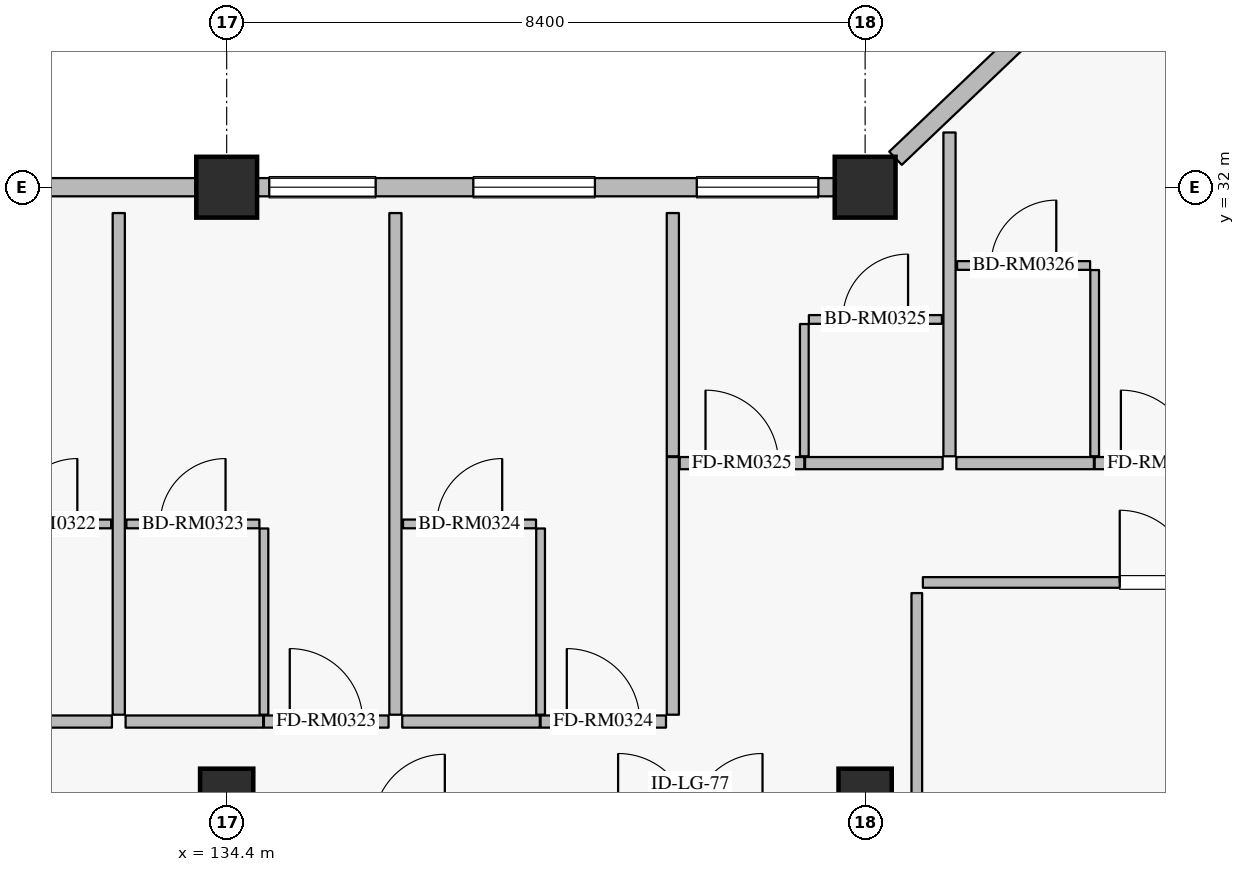
"""IFC4 building model, lengths in metres.
Left out: names, types, materials, properties, quantities, classifications, styles, units other than length and angle.
Written with IfcOpenShell. Run it as: python <this file> out.ifc"""

import sys

from ifc_helpers import new_model, si_unit, direction, frame, frame_2d, origin, origin_2d, place, context, subcontext, project, spatial, rectangle, extrude, element, fill, save


model = new_model("IFC4")
c1 = context("Model", 3, precision=1e-05, world=origin(), true_north=direction((0.0, 1.0)))
c2 = subcontext(c1, "Body", "Model", "MODEL_VIEW")
j1 = project(units=[si_unit("LENGTHUNIT", "METRE"), si_unit("PLANEANGLEUNIT", "RADIAN")], contexts=[c1])
p1 = place(None, origin())
s1 = spatial("IfcSite", under=j1, at=p1, CompositionType="ELEMENT")
p2 = place(p1, origin())
s2 = spatial("IfcBuilding", under=s1, at=p2, CompositionType="ELEMENT")
p3 = place(p2, frame((0.0, 0.0, 11.4)))
s3 = spatial("IfcBuildingStorey", under=s2, at=p3, CompositionType="ELEMENT", Elevation=11.4)
for number, where, z_axis, x_axis in (
    (1, (134.4, 32.0, 0.0), (0.0, 0.0, 1.0), (1.0, 0.0, 0.0)),
    (2, (142.8, 32.0, 0.0), (0.0, 0.0, 1.0), (1.0, 0.0, 0.0)),
):
    element("IfcColumn", number, at=place(p3, frame(where, z_axis=z_axis, x_axis=x_axis)), inside=s3, PredefinedType="COLUMN", context=c2, shape_type="SweptSolid", body=[
        extrude(rectangle(XDim=0.8, YDim=0.8, at=origin_2d()), origin(), (0.0, 0.0, 1.0), 4.8),
    ])
for number, where, z_axis, x_axis in (
    (3, (134.4, 24.0, 0.0), (0.0, 0.0, 1.0), (1.0, 0.0, 0.0)),
    (4, (142.8, 24.0, 0.0), (0.0, 0.0, 1.0), (1.0, 0.0, 0.0)),
):
    element("IfcColumn", number, at=place(p3, frame(where, z_axis=z_axis, x_axis=x_axis)), inside=s3, PredefinedType="COLUMN", context=c2, shape_type="SweptSolid", body=[
        extrude(rectangle(XDim=0.7, YDim=0.7, at=origin_2d()), origin(), (0.0, 0.0, 1.0), 4.8),
    ])
p4 = place(p3, frame((126.4, 32.0, 0.0), z_axis=(0.0, 0.0, 1.0), x_axis=(1.0, 0.0, 0.0)))
e5 = element("IfcWall", 5, at=p4, inside=s3, PredefinedType="SOLIDWALL", context=c2, shape_type="SweptSolid", body=[
    extrude(rectangle(XDim=7.6, YDim=0.24, at=frame_2d((3.8, 0.0))), origin(), (0.0, 0.0, 1.0), 4.1),
])
p5 = place(p4, frame((0.615, 0.0, 0.8)))
e6 = element("IfcOpeningElement", 6, at=p5, cuts=e5, PredefinedType="OPENING", context=c2, shape_type="SweptSolid", body=[
    extrude(rectangle(XDim=1.6, YDim=1.6, at=frame_2d((0.8, 0.8))), frame((0.0, 0.13, 0.0), z_axis=(0.0, -1.0, 0.0), x_axis=(1.0, 0.0, 0.0)), (0.0, 0.0, 1.0), 0.26),
])
p6 = place(p4, frame((3.955, 0.0, 0.8)))
e7 = element("IfcOpeningElement", 7, at=p6, cuts=e5, PredefinedType="OPENING", context=c2, shape_type="SweptSolid", body=[
    extrude(rectangle(XDim=1.6, YDim=1.6, at=frame_2d((0.8, 0.8))), frame((0.0, 0.13, 0.0), z_axis=(0.0, -1.0, 0.0), x_axis=(1.0, 0.0, 0.0)), (0.0, 0.0, 1.0), 0.26),
])
p7 = place(p3, frame((134.8, 32.0, 0.0), z_axis=(0.0, 0.0, 1.0), x_axis=(1.0, 0.0, 0.0)))
e8 = element("IfcWall", 8, at=p7, inside=s3, PredefinedType="SOLIDWALL", context=c2, shape_type="SweptSolid", body=[
    extrude(rectangle(XDim=7.6, YDim=0.24, at=frame_2d((3.8, 0.0))), origin(), (0.0, 0.0, 1.0), 4.13),
])
p8 = place(p7, frame((0.16, 0.0, 0.8)))
e9 = element("IfcOpeningElement", 9, at=p8, cuts=e8, PredefinedType="OPENING", context=c2, shape_type="SweptSolid", body=[
    extrude(rectangle(XDim=1.4, YDim=1.6, at=frame_2d((0.7, 0.8))), frame((0.0, 0.13, 0.0), z_axis=(0.0, -1.0, 0.0), x_axis=(1.0, 0.0, 0.0)), (0.0, 0.0, 1.0), 0.26),
])
p9 = place(p7, frame((2.845, 0.0, 0.8)))
e10 = element("IfcOpeningElement", 10, at=p9, cuts=e8, PredefinedType="OPENING", context=c2, shape_type="SweptSolid", body=[
    extrude(rectangle(XDim=1.6, YDim=1.6, at=frame_2d((0.8, 0.8))), frame((0.0, 0.13, 0.0), z_axis=(0.0, -1.0, 0.0), x_axis=(1.0, 0.0, 0.0)), (0.0, 0.0, 1.0), 0.26),
])
p10 = place(p7, frame((5.785, 0.0, 0.8)))
e11 = element("IfcOpeningElement", 11, at=p10, cuts=e8, PredefinedType="OPENING", context=c2, shape_type="SweptSolid", body=[
    extrude(rectangle(XDim=1.6, YDim=1.6, at=frame_2d((0.8, 0.8))), frame((0.0, 0.13, 0.0), z_axis=(0.0, -1.0, 0.0), x_axis=(1.0, 0.0, 0.0)), (0.0, 0.0, 1.0), 0.26),
])
p11 = place(p3, frame((143.2, 32.381, 0.0), z_axis=(0.0, 0.0, 1.0), x_axis=(0.724156739794, 0.689635422677, 0.0)))
e12 = element("IfcWall", 12, at=p11, inside=s3, PredefinedType="SOLIDWALL", context=c2, shape_type="SweptSolid", body=[
    extrude(rectangle(XDim=10.495, YDim=0.24, at=frame_2d((5.248, 0.0))), origin(), (0.0, 0.0, 1.0), 4.13),
])
p12 = place(p11, frame((2.701, 0.0, 0.8)))
e13 = element("IfcOpeningElement", 13, at=p12, cuts=e12, PredefinedType="OPENING", context=c2, shape_type="SweptSolid", body=[
    extrude(rectangle(XDim=1.6, YDim=1.6, at=frame_2d((0.8, 0.8))), frame((0.0, 0.13, 0.0), z_axis=(0.0, -1.0, 0.0), x_axis=(1.0, 0.0, 0.0)), (0.0, 0.0, 1.0), 0.26),
])
p13 = place(p11, frame((7.527, 0.0, 0.8)))
e14 = element("IfcOpeningElement", 14, at=p13, cuts=e12, PredefinedType="OPENING", context=c2, shape_type="SweptSolid", body=[
    extrude(rectangle(XDim=1.6, YDim=1.6, at=frame_2d((0.8, 0.8))), frame((0.0, 0.13, 0.0), z_axis=(0.0, -1.0, 0.0), x_axis=(1.0, 0.0, 0.0)), (0.0, 0.0, 1.0), 0.26),
])
p14 = place(p3, frame((131.08, 24.97, 0.0), z_axis=(0.0, 0.0, 1.0), x_axis=(1.0, 0.0, 0.0)))
e15 = element("IfcWall", 15, at=p14, inside=s3, PredefinedType="PARTITIONING", context=c2, shape_type="SweptSolid", body=[
    extrude(rectangle(XDim=1.81, YDim=0.16, at=frame_2d((0.905, 0.0))), origin(), (0.0, 0.0, 1.0), 4.535),
])
p15 = place(p3, frame((131.13, 27.57, 0.0), z_axis=(0.0, 0.0, 1.0), x_axis=(1.0, 0.0, 0.0)))
e16 = element("IfcWall", 16, at=p15, inside=s3, PredefinedType="PARTITIONING", context=c2, shape_type="SweptSolid", body=[
    extrude(rectangle(XDim=1.75, YDim=0.115, at=frame_2d((0.875, 0.0))), origin(), (0.0, 0.0, 1.0), 4.535),
])
p16 = place(p15, frame((0.445, 0.0, 0.0)))
e17 = element("IfcOpeningElement", 17, at=p16, cuts=e16, PredefinedType="OPENING", context=c2, shape_type="SweptSolid", body=[
    extrude(rectangle(XDim=0.86, YDim=2.12, at=frame_2d((0.43, 1.06))), frame((0.0, 0.067, 0.0), z_axis=(0.0, -1.0, 0.0), x_axis=(1.0, 0.0, 0.0)), (0.0, 0.0, 1.0), 0.135),
])
p17 = place(p3, frame((133.07, 24.97, 0.0), z_axis=(0.0, 0.0, 1.0), x_axis=(1.0, 0.0, 0.0)))
e18 = element("IfcWall", 18, at=p17, inside=s3, PredefinedType="PARTITIONING", context=c2, shape_type="SweptSolid", body=[
    extrude(rectangle(XDim=1.81, YDim=0.16, at=frame_2d((0.905, 0.0))), origin(), (0.0, 0.0, 1.0), 4.535),
])
p18 = place(p3, frame((134.89, 24.97, 0.0), z_axis=(0.0, 0.0, 1.0), x_axis=(1.0, 0.0, 0.0)))
e19 = element("IfcWall", 19, at=p18, inside=s3, PredefinedType="PARTITIONING", context=c2, shape_type="SweptSolid", body=[
    extrude(rectangle(XDim=1.64, YDim=0.16, at=frame_2d((0.82, 0.0))), origin(), (0.0, 0.0, 1.0), 4.535),
])
p19 = place(p18, frame((0.34, 0.0, 0.0)))
e20 = element("IfcOpeningElement", 20, at=p19, cuts=e19, PredefinedType="OPENING", context=c2, shape_type="SweptSolid", body=[
    extrude(rectangle(XDim=0.96, YDim=2.2, at=frame_2d((0.48, 1.1))), frame((0.0, 0.09, 0.0), z_axis=(0.0, -1.0, 0.0), x_axis=(1.0, 0.0, 0.0)), (0.0, 0.0, 1.0), 0.18),
])
p20 = place(p3, frame((134.89, 25.06, 0.0), z_axis=(0.0, 0.0, 1.0), x_axis=(0.0, 1.0, 0.0)))
e21 = element("IfcWall", 21, at=p20, inside=s3, PredefinedType="PARTITIONING", context=c2, shape_type="SweptSolid", body=[
    extrude(rectangle(XDim=2.45, YDim=0.115, at=frame_2d((1.225, 0.0))), origin(), (0.0, 0.0, 1.0), 4.535),
])
p21 = place(p3, frame((133.08, 27.57, 0.0), z_axis=(0.0, 0.0, 1.0), x_axis=(1.0, 0.0, 0.0)))
e22 = element("IfcWall", 22, at=p21, inside=s3, PredefinedType="PARTITIONING", context=c2, shape_type="SweptSolid", body=[
    extrude(rectangle(XDim=1.75, YDim=0.115, at=frame_2d((0.875, 0.0))), origin(), (0.0, 0.0, 1.0), 4.535),
])
p22 = place(p21, frame((0.445, 0.0, 0.0)))
e23 = element("IfcOpeningElement", 23, at=p22, cuts=e22, PredefinedType="OPENING", context=c2, shape_type="SweptSolid", body=[
    extrude(rectangle(XDim=0.86, YDim=2.12, at=frame_2d((0.43, 1.06))), frame((0.0, 0.067, 0.0), z_axis=(0.0, -1.0, 0.0), x_axis=(1.0, 0.0, 0.0)), (0.0, 0.0, 1.0), 0.135),
])
p23 = place(p3, frame((132.98, 25.06, 0.0), z_axis=(0.0, 0.0, 1.0), x_axis=(0.0, 1.0, 0.0)))
e24 = element("IfcWall", 24, at=p23, inside=s3, PredefinedType="PARTITIONING", context=c2, shape_type="SweptSolid", body=[
    extrude(rectangle(XDim=6.6, YDim=0.16, at=frame_2d((3.3, 0.0))), origin(), (0.0, 0.0, 1.0), 4.535),
])
p24 = place(p3, frame((136.71, 24.97, 0.0), z_axis=(0.0, 0.0, 1.0), x_axis=(1.0, 0.0, 0.0)))
e25 = element("IfcWall", 25, at=p24, inside=s3, PredefinedType="PARTITIONING", context=c2, shape_type="SweptSolid", body=[
    extrude(rectangle(XDim=1.81, YDim=0.16, at=frame_2d((0.905, 0.0))), origin(), (0.0, 0.0, 1.0), 4.535),
])
p25 = place(p3, frame((138.53, 24.97, 0.0), z_axis=(0.0, 0.0, 1.0), x_axis=(1.0, 0.0, 0.0)))
e26 = element("IfcWall", 26, at=p25, inside=s3, PredefinedType="PARTITIONING", context=c2, shape_type="SweptSolid", body=[
    extrude(rectangle(XDim=1.65, YDim=0.16, at=frame_2d((0.825, 0.0))), origin(), (0.0, 0.0, 1.0), 4.535),
])
p26 = place(p25, frame((0.345, 0.0, 0.0)))
e27 = element("IfcOpeningElement", 27, at=p26, cuts=e26, PredefinedType="OPENING", context=c2, shape_type="SweptSolid", body=[
    extrude(rectangle(XDim=0.96, YDim=2.2, at=frame_2d((0.48, 1.1))), frame((0.0, 0.09, 0.0), z_axis=(0.0, -1.0, 0.0), x_axis=(1.0, 0.0, 0.0)), (0.0, 0.0, 1.0), 0.18),
])
p27 = place(p3, frame((138.53, 25.06, 0.0), z_axis=(0.0, 0.0, 1.0), x_axis=(0.0, 1.0, 0.0)))
e28 = element("IfcWall", 28, at=p27, inside=s3, PredefinedType="PARTITIONING", context=c2, shape_type="SweptSolid", body=[
    extrude(rectangle(XDim=2.45, YDim=0.115, at=frame_2d((1.225, 0.0))), origin(), (0.0, 0.0, 1.0), 4.535),
])
p28 = place(p3, frame((136.72, 27.57, 0.0), z_axis=(0.0, 0.0, 1.0), x_axis=(1.0, 0.0, 0.0)))
e29 = element("IfcWall", 29, at=p28, inside=s3, PredefinedType="PARTITIONING", context=c2, shape_type="SweptSolid", body=[
    extrude(rectangle(XDim=1.75, YDim=0.115, at=frame_2d((0.875, 0.0))), origin(), (0.0, 0.0, 1.0), 4.535),
])
p29 = place(p28, frame((0.445, 0.0, 0.0)))
e30 = element("IfcOpeningElement", 30, at=p29, cuts=e29, PredefinedType="OPENING", context=c2, shape_type="SweptSolid", body=[
    extrude(rectangle(XDim=0.86, YDim=2.12, at=frame_2d((0.43, 1.06))), frame((0.0, 0.067, 0.0), z_axis=(0.0, -1.0, 0.0), x_axis=(1.0, 0.0, 0.0)), (0.0, 0.0, 1.0), 0.135),
])
p30 = place(p3, frame((136.62, 25.06, 0.0), z_axis=(0.0, 0.0, 1.0), x_axis=(0.0, 1.0, 0.0)))
e31 = element("IfcWall", 31, at=p30, inside=s3, PredefinedType="PARTITIONING", context=c2, shape_type="SweptSolid", body=[
    extrude(rectangle(XDim=6.6, YDim=0.16, at=frame_2d((3.3, 0.0))), origin(), (0.0, 0.0, 1.0), 4.535),
])
p31 = place(p3, frame((140.27, 25.06, 0.0), z_axis=(0.0, 0.0, 1.0), x_axis=(0.0, 1.0, 0.0)))
e32 = element("IfcWall", 32, at=p31, inside=s3, PredefinedType="PARTITIONING", context=c2, shape_type="SweptSolid", body=[
    extrude(rectangle(XDim=3.39, YDim=0.16, at=frame_2d((1.695, 0.0))), origin(), (0.0, 0.0, 1.0), 4.535),
])
p32 = place(p3, frame((140.36, 28.37, 0.0), z_axis=(0.0, 0.0, 1.0), x_axis=(1.0, 0.0, 0.0)))
e33 = element("IfcWall", 33, at=p32, inside=s3, PredefinedType="PARTITIONING", context=c2, shape_type="SweptSolid", body=[
    extrude(rectangle(XDim=1.64, YDim=0.16, at=frame_2d((0.82, 0.0))), origin(), (0.0, 0.0, 1.0), 4.535),
])
p33 = place(p32, frame((0.34, 0.0, 0.0)))
e34 = element("IfcOpeningElement", 34, at=p33, cuts=e33, PredefinedType="OPENING", context=c2, shape_type="SweptSolid", body=[
    extrude(rectangle(XDim=0.96, YDim=2.2, at=frame_2d((0.48, 1.1))), frame((0.0, 0.09, 0.0), z_axis=(0.0, -1.0, 0.0), x_axis=(1.0, 0.0, 0.0)), (0.0, 0.0, 1.0), 0.18),
])
p34 = place(p3, frame((142.01, 28.37, 0.0), z_axis=(0.0, 0.0, 1.0), x_axis=(1.0, 0.0, 0.0)))
e35 = element("IfcWall", 35, at=p34, inside=s3, PredefinedType="PARTITIONING", context=c2, shape_type="SweptSolid", body=[
    extrude(rectangle(XDim=1.81, YDim=0.16, at=frame_2d((0.905, 0.0))), origin(), (0.0, 0.0, 1.0), 4.535),
])
p35 = place(p3, frame((142.0, 28.46, 0.0), z_axis=(0.0, 0.0, 1.0), x_axis=(0.0, 1.0, 0.0)))
e36 = element("IfcWall", 36, at=p35, inside=s3, PredefinedType="PARTITIONING", context=c2, shape_type="SweptSolid", body=[
    extrude(rectangle(XDim=1.74, YDim=0.115, at=frame_2d((0.87, 0.0))), origin(), (0.0, 0.0, 1.0), 4.535),
])
p36 = place(p3, frame((142.06, 30.26, 0.0), z_axis=(0.0, 0.0, 1.0), x_axis=(1.0, 0.0, 0.0)))
e37 = element("IfcWall", 37, at=p36, inside=s3, PredefinedType="PARTITIONING", context=c2, shape_type="SweptSolid", body=[
    extrude(rectangle(XDim=1.75, YDim=0.115, at=frame_2d((0.875, 0.0))), origin(), (0.0, 0.0, 1.0), 4.535),
])
p37 = place(p36, frame((0.445, 0.0, 0.0)))
e38 = element("IfcOpeningElement", 38, at=p37, cuts=e37, PredefinedType="OPENING", context=c2, shape_type="SweptSolid", body=[
    extrude(rectangle(XDim=0.86, YDim=2.12, at=frame_2d((0.43, 1.06))), frame((0.0, 0.067, 0.0), z_axis=(0.0, -1.0, 0.0), x_axis=(1.0, 0.0, 0.0)), (0.0, 0.0, 1.0), 0.135),
])
p38 = place(p3, frame((140.27, 28.46, 0.0), z_axis=(0.0, 0.0, 1.0), x_axis=(0.0, 1.0, 0.0)))
e39 = element("IfcWall", 39, at=p38, inside=s3, PredefinedType="PARTITIONING", context=c2, shape_type="SweptSolid", body=[
    extrude(rectangle(XDim=3.2, YDim=0.16, at=frame_2d((1.6, 0.0))), origin(), (0.0, 0.0, 1.0), 4.535),
])
p39 = place(p3, frame((144.0, 28.37, 0.0), z_axis=(0.0, 0.0, 1.0), x_axis=(1.0, 0.0, 0.0)))
e40 = element("IfcWall", 40, at=p39, inside=s3, PredefinedType="PARTITIONING", context=c2, shape_type="SweptSolid", body=[
    extrude(rectangle(XDim=1.81, YDim=0.16, at=frame_2d((0.905, 0.0))), origin(), (0.0, 0.0, 1.0), 4.535),
])
p40 = place(p3, frame((145.82, 28.37, 0.0), z_axis=(0.0, 0.0, 1.0), x_axis=(1.0, 0.0, 0.0)))
e41 = element("IfcWall", 41, at=p40, inside=s3, PredefinedType="PARTITIONING", context=c2, shape_type="SweptSolid", body=[
    extrude(rectangle(XDim=1.65, YDim=0.16, at=frame_2d((0.825, 0.0))), origin(), (0.0, 0.0, 1.0), 4.535),
])
p41 = place(p40, frame((0.345, 0.0, 0.0)))
e42 = element("IfcOpeningElement", 42, at=p41, cuts=e41, PredefinedType="OPENING", context=c2, shape_type="SweptSolid", body=[
    extrude(rectangle(XDim=0.96, YDim=2.2, at=frame_2d((0.48, 1.1))), frame((0.0, 0.09, 0.0), z_axis=(0.0, -1.0, 0.0), x_axis=(1.0, 0.0, 0.0)), (0.0, 0.0, 1.0), 0.18),
])
p42 = place(p3, frame((145.82, 28.46, 0.0), z_axis=(0.0, 0.0, 1.0), x_axis=(0.0, 1.0, 0.0)))
e43 = element("IfcWall", 43, at=p42, inside=s3, PredefinedType="PARTITIONING", context=c2, shape_type="SweptSolid", body=[
    extrude(rectangle(XDim=2.45, YDim=0.115, at=frame_2d((1.225, 0.0))), origin(), (0.0, 0.0, 1.0), 4.535),
])
p43 = place(p3, frame((144.01, 30.97, 0.0), z_axis=(0.0, 0.0, 1.0), x_axis=(1.0, 0.0, 0.0)))
e44 = element("IfcWall", 44, at=p43, inside=s3, PredefinedType="PARTITIONING", context=c2, shape_type="SweptSolid", body=[
    extrude(rectangle(XDim=1.75, YDim=0.115, at=frame_2d((0.875, 0.0))), origin(), (0.0, 0.0, 1.0), 4.535),
])
p44 = place(p43, frame((0.445, 0.0, 0.0)))
e45 = element("IfcOpeningElement", 45, at=p44, cuts=e44, PredefinedType="OPENING", context=c2, shape_type="SweptSolid", body=[
    extrude(rectangle(XDim=0.86, YDim=2.12, at=frame_2d((0.43, 1.06))), frame((0.0, 0.067, 0.0), z_axis=(0.0, -1.0, 0.0), x_axis=(1.0, 0.0, 0.0)), (0.0, 0.0, 1.0), 0.135),
])
p45 = place(p3, frame((143.91, 28.46, 0.0), z_axis=(0.0, 0.0, 1.0), x_axis=(0.0, 1.0, 0.0)))
e46 = element("IfcWall", 46, at=p45, inside=s3, PredefinedType="PARTITIONING", context=c2, shape_type="SweptSolid", body=[
    extrude(rectangle(XDim=4.26, YDim=0.16, at=frame_2d((2.13, 0.0))), origin(), (0.0, 0.0, 1.0), 4.535),
])
p46 = place(p3, frame((143.56, 26.8, 0.0), z_axis=(0.0, 0.0, 1.0), x_axis=(1.0, 0.0, 0.0)))
e47 = element("IfcWall", 47, at=p46, inside=s3, PredefinedType="PARTITIONING", context=c2, shape_type="SweptSolid", body=[
    extrude(rectangle(XDim=7.08, YDim=0.14, at=frame_2d((3.54, 0.0))), origin(), (0.0, 0.0, 1.0), 4.535),
])
p47 = place(p46, frame((2.59, 0.0, 0.0)))
e48 = element("IfcOpeningElement", 48, at=p47, cuts=e47, PredefinedType="OPENING", context=c2, shape_type="SweptSolid", body=[
    extrude(rectangle(XDim=1.9, YDim=2.4, at=frame_2d((0.95, 1.2))), frame((0.0, 0.08, 0.0), z_axis=(0.0, -1.0, 0.0), x_axis=(1.0, 0.0, 0.0)), (0.0, 0.0, 1.0), 0.16),
])
p48 = place(p3, frame((143.48, 23.45, 0.0), z_axis=(0.0, 0.0, 1.0), x_axis=(0.0, 1.0, 0.0)))
e49 = element("IfcWall", 49, at=p48, inside=s3, PredefinedType="PARTITIONING", context=c2, shape_type="SweptSolid", body=[
    extrude(rectangle(XDim=3.21, YDim=0.14, at=frame_2d((1.605, 0.0))), origin(), (0.0, 0.0, 1.0), 4.535),
])
p49 = place(p8, origin())
e50 = element("IfcWindow", 50, at=p49, inside=s3, PartitioningType="SINGLE_PANEL", PredefinedType="WINDOW", context=c2, shape_type="SweptSolid", body=[
    extrude(rectangle(XDim=1.4, YDim=1.6, at=frame_2d((0.7, 0.8))), frame((0.0, 0.03, 0.0), z_axis=(0.0, -1.0, 0.0), x_axis=(1.0, 0.0, 0.0)), (0.0, 0.0, 1.0), 0.06),
])
fill(e9, e50)
p50 = place(p9, origin())
e51 = element("IfcWindow", 51, at=p50, inside=s3, PartitioningType="SINGLE_PANEL", PredefinedType="WINDOW", context=c2, shape_type="SweptSolid", body=[
    extrude(rectangle(XDim=1.6, YDim=1.6, at=frame_2d((0.8, 0.8))), frame((0.0, 0.03, 0.0), z_axis=(0.0, -1.0, 0.0), x_axis=(1.0, 0.0, 0.0)), (0.0, 0.0, 1.0), 0.06),
])
fill(e10, e51)
p51 = place(p10, origin())
e52 = element("IfcWindow", 52, at=p51, inside=s3, PartitioningType="SINGLE_PANEL", PredefinedType="WINDOW", context=c2, shape_type="SweptSolid", body=[
    extrude(rectangle(XDim=1.6, YDim=1.6, at=frame_2d((0.8, 0.8))), frame((0.0, 0.03, 0.0), z_axis=(0.0, -1.0, 0.0), x_axis=(1.0, 0.0, 0.0)), (0.0, 0.0, 1.0), 0.06),
])
fill(e11, e52)
p52 = place(p16, origin())
e53 = element("IfcDoor", 53, at=p52, inside=s3, OperationType="SINGLE_SWING_RIGHT", PredefinedType="DOOR", context=c2, shape_type="SweptSolid", body=[
    extrude(rectangle(XDim=0.86, YDim=2.12, at=frame_2d((0.43, 1.06))), frame((0.0, 0.025, 0.0), z_axis=(0.0, -1.0, 0.0), x_axis=(1.0, 0.0, 0.0)), (0.0, 0.0, 1.0), 0.05),
])
fill(e17, e53)
p53 = place(p19, origin())
e54 = element("IfcDoor", 54, at=p53, inside=s3, OperationType="SINGLE_SWING_LEFT", PredefinedType="DOOR", context=c2, shape_type="SweptSolid", body=[
    extrude(rectangle(XDim=0.96, YDim=2.2, at=frame_2d((0.48, 1.1))), frame((0.0, 0.025, 0.0), z_axis=(0.0, -1.0, 0.0), x_axis=(1.0, 0.0, 0.0)), (0.0, 0.0, 1.0), 0.05),
])
fill(e20, e54)
p54 = place(p22, origin())
e55 = element("IfcDoor", 55, at=p54, inside=s3, OperationType="SINGLE_SWING_RIGHT", PredefinedType="DOOR", context=c2, shape_type="SweptSolid", body=[
    extrude(rectangle(XDim=0.86, YDim=2.12, at=frame_2d((0.43, 1.06))), frame((0.0, 0.025, 0.0), z_axis=(0.0, -1.0, 0.0), x_axis=(1.0, 0.0, 0.0)), (0.0, 0.0, 1.0), 0.05),
])
fill(e23, e55)
p55 = place(p26, origin())
e56 = element("IfcDoor", 56, at=p55, inside=s3, OperationType="SINGLE_SWING_LEFT", PredefinedType="DOOR", context=c2, shape_type="SweptSolid", body=[
    extrude(rectangle(XDim=0.96, YDim=2.2, at=frame_2d((0.48, 1.1))), frame((0.0, 0.025, 0.0), z_axis=(0.0, -1.0, 0.0), x_axis=(1.0, 0.0, 0.0)), (0.0, 0.0, 1.0), 0.05),
])
fill(e27, e56)
p56 = place(p29, origin())
e57 = element("IfcDoor", 57, at=p56, inside=s3, OperationType="SINGLE_SWING_RIGHT", PredefinedType="DOOR", context=c2, shape_type="SweptSolid", body=[
    extrude(rectangle(XDim=0.86, YDim=2.12, at=frame_2d((0.43, 1.06))), frame((0.0, 0.025, 0.0), z_axis=(0.0, -1.0, 0.0), x_axis=(1.0, 0.0, 0.0)), (0.0, 0.0, 1.0), 0.05),
])
fill(e30, e57)
p57 = place(p33, origin())
e58 = element("IfcDoor", 58, at=p57, inside=s3, OperationType="SINGLE_SWING_LEFT", PredefinedType="DOOR", context=c2, shape_type="SweptSolid", body=[
    extrude(rectangle(XDim=0.96, YDim=2.2, at=frame_2d((0.48, 1.1))), frame((0.0, 0.025, 0.0), z_axis=(0.0, -1.0, 0.0), x_axis=(1.0, 0.0, 0.0)), (0.0, 0.0, 1.0), 0.05),
])
fill(e34, e58)
p58 = place(p37, origin())
e59 = element("IfcDoor", 59, at=p58, inside=s3, OperationType="SINGLE_SWING_RIGHT", PredefinedType="DOOR", context=c2, shape_type="SweptSolid", body=[
    extrude(rectangle(XDim=0.86, YDim=2.12, at=frame_2d((0.43, 1.06))), frame((0.0, 0.025, 0.0), z_axis=(0.0, -1.0, 0.0), x_axis=(1.0, 0.0, 0.0)), (0.0, 0.0, 1.0), 0.05),
])
fill(e38, e59)
p59 = place(p41, origin())
e60 = element("IfcDoor", 60, at=p59, inside=s3, OperationType="SINGLE_SWING_LEFT", PredefinedType="DOOR", context=c2, shape_type="SweptSolid", body=[
    extrude(rectangle(XDim=0.96, YDim=2.2, at=frame_2d((0.48, 1.1))), frame((0.0, 0.025, 0.0), z_axis=(0.0, -1.0, 0.0), x_axis=(1.0, 0.0, 0.0)), (0.0, 0.0, 1.0), 0.05),
])
fill(e42, e60)
p60 = place(p44, origin())
e61 = element("IfcDoor", 61, at=p60, inside=s3, OperationType="SINGLE_SWING_RIGHT", PredefinedType="DOOR", context=c2, shape_type="SweptSolid", body=[
    extrude(rectangle(XDim=0.86, YDim=2.12, at=frame_2d((0.43, 1.06))), frame((0.0, 0.025, 0.0), z_axis=(0.0, -1.0, 0.0), x_axis=(1.0, 0.0, 0.0)), (0.0, 0.0, 1.0), 0.05),
])
fill(e45, e61)
p61 = place(p47, origin())
e62 = element("IfcDoor", 62, at=p61, inside=s3, OperationType="DOUBLE_DOOR_SINGLE_SWING", PredefinedType="DOOR", context=c2, shape_type="SweptSolid", body=[
    extrude(rectangle(XDim=1.9, YDim=2.4, at=frame_2d((0.95, 1.2))), frame((0.0, 0.025, 0.0), z_axis=(0.0, -1.0, 0.0), x_axis=(1.0, 0.0, 0.0)), (0.0, 0.0, 1.0), 0.05),
])
fill(e48, e62)
save(model, sys.argv[1])
